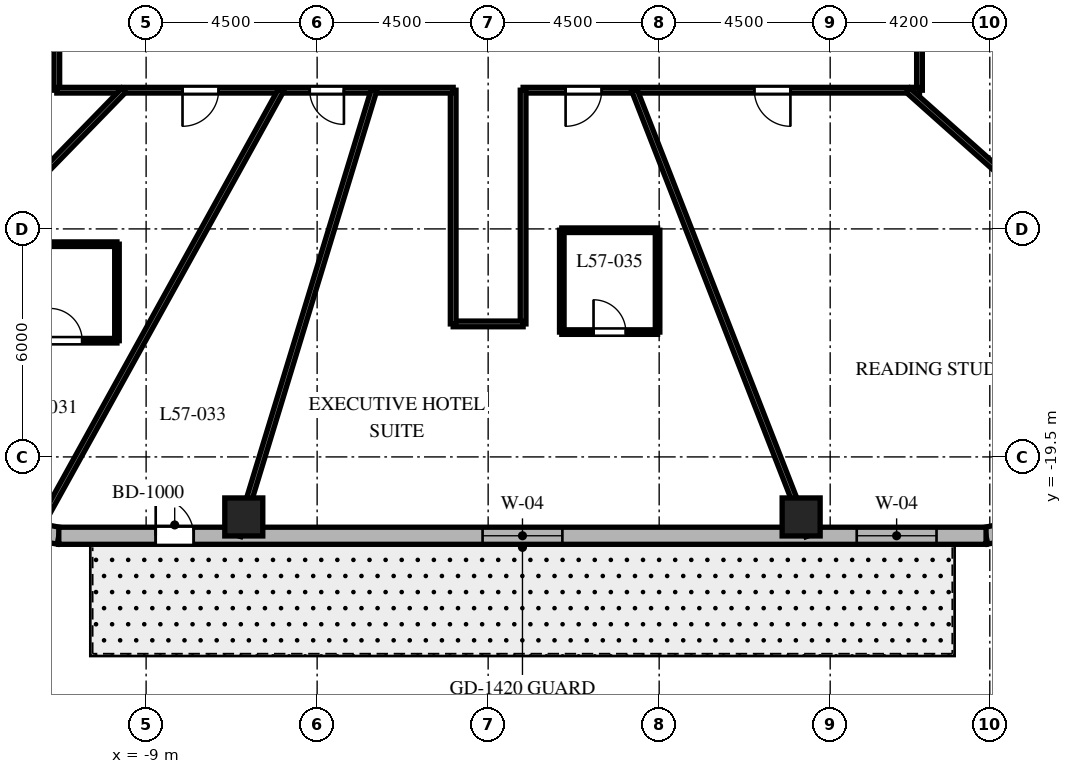
"""IFC4 building model, lengths in metres.
Left out: names, types, materials, properties, quantities, classifications, styles, units other than length and angle.
Written with IfcOpenShell. Run it as: python <this file> out.ifc"""

import sys

from ifc_helpers import new_model, si_unit, direction, frame, frame_2d, origin, origin_2d, place, context, subcontext, project, spatial, rectangle, extrude, element, fill, save


model = new_model("IFC4")
c1 = context("Model", 3, precision=1e-05, world=origin(), true_north=direction((0.0, 1.0)))
c2 = subcontext(c1, "Body", "Model", "MODEL_VIEW")
j1 = project(units=[si_unit("LENGTHUNIT", "METRE"), si_unit("PLANEANGLEUNIT", "RADIAN")], contexts=[c1])
p1 = place(None, origin())
s1 = spatial("IfcSite", under=j1, at=p1, CompositionType="ELEMENT")
p2 = place(p1, origin())
s2 = spatial("IfcBuilding", under=s1, at=p2, CompositionType="ELEMENT")
p3 = place(p2, frame((0.0, 0.0, 229.3)))
s3 = spatial("IfcBuildingStorey", under=s2, at=p3, CompositionType="ELEMENT", Elevation=229.3)
for number, where, z_axis, x_axis in (
    (1, (-6.43, -21.08, 0.0), (0.0, 0.0, 1.0), (1.0, 0.0, 0.0)),
    (2, (8.236, -21.08, 0.0), (0.0, 0.0, 1.0), (1.0, 0.0, 0.0)),
):
    element("IfcColumn", number, at=place(p3, frame(where, z_axis=z_axis, x_axis=x_axis)), inside=s3, PredefinedType="COLUMN", context=c2, shape_type="SweptSolid", body=[
        extrude(rectangle(XDim=1.0, YDim=1.0, at=origin_2d()), origin(), (0.0, 0.0, 1.0), 3.8),
    ])
p4 = place(p3, frame((-12.546, -21.34, 0.0), z_axis=(0.0, 0.0, 1.0), x_axis=(0.982686750835, -0.18527479519, 0.0)))
e3 = element("IfcWall", 3, at=p4, inside=s3, PredefinedType="SOLIDWALL", context=c2, shape_type="SweptSolid", body=[
    extrude(rectangle(XDim=1.27, YDim=0.45, at=frame_2d((0.635, 0.0))), origin(), (0.0, 0.0, 1.0), 3.5),
])
p5 = place(p3, frame((13.102, -21.575, 0.0), z_axis=(0.0, 0.0, 1.0), x_axis=(0.978757421505, 0.205021730188, 0.0)))
e4 = element("IfcWall", 4, at=p5, inside=s3, PredefinedType="SOLIDWALL", context=c2, shape_type="SweptSolid", body=[
    extrude(rectangle(XDim=1.406, YDim=0.45, at=frame_2d((0.703, 0.0))), origin(), (0.0, 0.0, 1.0), 3.5),
])
p6 = place(p3, frame((-11.298, -21.575, 0.0), z_axis=(0.0, 0.0, 1.0), x_axis=(1.0, 0.0, 0.0)))
e5 = element("IfcWall", 5, at=p6, inside=s3, PredefinedType="SOLIDWALL", context=c2, shape_type="SweptSolid", body=[
    extrude(rectangle(XDim=24.399, YDim=0.45, at=frame_2d((12.2, 0.0))), origin(), (0.0, 0.0, 1.0), 3.5),
])
p7 = place(p6, frame((2.55, 0.0, 0.0)))
e6 = element("IfcOpeningElement", 6, at=p7, cuts=e5, PredefinedType="OPENING", context=c2, shape_type="SweptSolid", body=[
    extrude(rectangle(XDim=1.0, YDim=2.15, at=frame_2d((0.5, 1.075))), frame((0.0, 0.235, 0.0), z_axis=(0.0, -1.0, 0.0), x_axis=(1.0, 0.0, 0.0)), (0.0, 0.0, 1.0), 0.47),
])
p8 = place(p6, frame((11.151, 0.0, 0.8)))
e7 = element("IfcOpeningElement", 7, at=p8, cuts=e5, PredefinedType="OPENING", context=c2, shape_type="SweptSolid", body=[
    extrude(rectangle(XDim=2.1, YDim=1.85, at=frame_2d((1.05, 0.925))), frame((0.0, 0.235, 0.0), z_axis=(0.0, -1.0, 0.0), x_axis=(1.0, 0.0, 0.0)), (0.0, 0.0, 1.0), 0.47),
])
p9 = place(p6, frame((20.996, 0.0, 0.8)))
e8 = element("IfcOpeningElement", 8, at=p9, cuts=e5, PredefinedType="OPENING", context=c2, shape_type="SweptSolid", body=[
    extrude(rectangle(XDim=2.1, YDim=1.85, at=frame_2d((1.05, 0.925))), frame((0.0, 0.235, 0.0), z_axis=(0.0, -1.0, 0.0), x_axis=(1.0, 0.0, 0.0)), (0.0, 0.0, 1.0), 0.47),
])
p10 = place(p3, frame((-11.35, -9.85, 0.0), z_axis=(0.0, 0.0, 1.0), x_axis=(0.0, 1.0, 0.0)))
e9 = element("IfcWall", 9, at=p10, inside=s3, PredefinedType="PARTITIONING", context=c2, shape_type="SweptSolid", body=[
    extrude(rectangle(XDim=12.4, YDim=0.15, at=frame_2d((6.2, 0.0))), origin(), (0.0, 0.0, 1.0), 2.99),
])
p11 = place(p10, frame((8.835, 0.0, 0.0)))
e10 = element("IfcOpeningElement", 10, at=p11, cuts=e9, PredefinedType="OPENING", context=c2, shape_type="SweptSolid", body=[
    extrude(rectangle(XDim=0.95, YDim=2.03, at=frame_2d((0.475, 1.015))), frame((0.0, 0.085, 0.0), z_axis=(0.0, -1.0, 0.0), x_axis=(1.0, 0.0, 0.0)), (0.0, 0.0, 1.0), 0.17),
])
p12 = place(p10, frame((4.443, 0.0, 0.0)))
e11 = element("IfcOpeningElement", 11, at=p12, cuts=e9, PredefinedType="OPENING", context=c2, shape_type="SweptSolid", body=[
    extrude(rectangle(XDim=0.95, YDim=2.03, at=frame_2d((0.475, 1.015))), frame((0.0, 0.085, 0.0), z_axis=(0.0, -1.0, 0.0), x_axis=(1.0, 0.0, 0.0)), (0.0, 0.0, 1.0), 0.17),
])
p13 = place(p10, frame((1.242, 0.0, 0.0)))
e12 = element("IfcOpeningElement", 12, at=p13, cuts=e9, PredefinedType="OPENING", context=c2, shape_type="SweptSolid", body=[
    extrude(rectangle(XDim=0.9, YDim=2.03, at=frame_2d((0.45, 1.015))), frame((0.0, 0.085, 0.0), z_axis=(0.0, -1.0, 0.0), x_axis=(1.0, 0.0, 0.0)), (0.0, 0.0, 1.0), 0.17),
])
p14 = place(p3, frame((11.35, -4.4, 0.0), z_axis=(0.0, 0.0, 1.0), x_axis=(0.0, -1.0, 0.0)))
e13 = element("IfcWall", 13, at=p14, inside=s3, PredefinedType="PARTITIONING", context=c2, shape_type="SweptSolid", body=[
    extrude(rectangle(XDim=5.45, YDim=0.15, at=frame_2d((2.725, 0.0))), origin(), (0.0, 0.0, 1.0), 2.99),
])
p15 = place(p14, frame((2.466, 0.0, 0.0)))
e14 = element("IfcOpeningElement", 14, at=p15, cuts=e13, PredefinedType="OPENING", context=c2, shape_type="SweptSolid", body=[
    extrude(rectangle(XDim=0.95, YDim=2.03, at=frame_2d((0.475, 1.015))), frame((0.0, 0.085, 0.0), z_axis=(0.0, -1.0, 0.0), x_axis=(1.0, 0.0, 0.0)), (0.0, 0.0, 1.0), 0.17),
])
p16 = place(p3, frame((11.35, -9.85, 0.0), z_axis=(0.0, 0.0, 1.0), x_axis=(-1.0, 0.0, 0.0)))
e15 = element("IfcWall", 15, at=p16, inside=s3, PredefinedType="PARTITIONING", context=c2, shape_type="SweptSolid", body=[
    extrude(rectangle(XDim=10.43, YDim=0.15, at=frame_2d((5.215, 0.0))), origin(), (0.0, 0.0, 1.0), 2.99),
])
p17 = place(p16, frame((8.362, 0.0, 0.0)))
e16 = element("IfcOpeningElement", 16, at=p17, cuts=e15, PredefinedType="OPENING", context=c2, shape_type="SweptSolid", body=[
    extrude(rectangle(XDim=0.95, YDim=2.03, at=frame_2d((0.475, 1.015))), frame((0.0, 0.085, 0.0), z_axis=(0.0, -1.0, 0.0), x_axis=(1.0, 0.0, 0.0)), (0.0, 0.0, 1.0), 0.17),
])
p18 = place(p16, frame((3.396, 0.0, 0.0)))
e17 = element("IfcOpeningElement", 17, at=p18, cuts=e15, PredefinedType="OPENING", context=c2, shape_type="SweptSolid", body=[
    extrude(rectangle(XDim=0.95, YDim=2.03, at=frame_2d((0.475, 1.015))), frame((0.0, 0.085, 0.0), z_axis=(0.0, -1.0, 0.0), x_axis=(1.0, 0.0, 0.0)), (0.0, 0.0, 1.0), 0.17),
])
p19 = place(p3, frame((0.92, -9.85, 0.0), z_axis=(0.0, 0.0, 1.0), x_axis=(0.0, -1.0, 0.0)))
e18 = element("IfcWall", 18, at=p19, inside=s3, PredefinedType="PARTITIONING", context=c2, shape_type="SweptSolid", body=[
    extrude(rectangle(XDim=6.15, YDim=0.15, at=frame_2d((3.075, 0.0))), origin(), (0.0, 0.0, 1.0), 3.026),
])
p20 = place(p3, frame((0.92, -16.0, 0.0), z_axis=(0.0, 0.0, 1.0), x_axis=(-1.0, 0.0, 0.0)))
e19 = element("IfcWall", 19, at=p20, inside=s3, PredefinedType="PARTITIONING", context=c2, shape_type="SweptSolid", body=[
    extrude(rectangle(XDim=1.84, YDim=0.15, at=frame_2d((0.92, 0.0))), origin(), (0.0, 0.0, 1.0), 3.5),
])
p21 = place(p3, frame((-0.92, -16.0, 0.0), z_axis=(0.0, 0.0, 1.0), x_axis=(0.0, 1.0, 0.0)))
e20 = element("IfcWall", 20, at=p21, inside=s3, PredefinedType="PARTITIONING", context=c2, shape_type="SweptSolid", body=[
    extrude(rectangle(XDim=6.15, YDim=0.15, at=frame_2d((3.075, 0.0))), origin(), (0.0, 0.0, 1.0), 3.026),
])
p22 = place(p3, frame((-0.92, -9.85, 0.0), z_axis=(0.0, 0.0, 1.0), x_axis=(-1.0, 0.0, 0.0)))
e21 = element("IfcWall", 21, at=p22, inside=s3, PredefinedType="PARTITIONING", context=c2, shape_type="SweptSolid", body=[
    extrude(rectangle(XDim=10.43, YDim=0.15, at=frame_2d((5.215, 0.0))), origin(), (0.0, 0.0, 1.0), 2.99),
])
p23 = place(p22, frame((6.172, 0.0, 0.0)))
e22 = element("IfcOpeningElement", 22, at=p23, cuts=e21, PredefinedType="OPENING", context=c2, shape_type="SweptSolid", body=[
    extrude(rectangle(XDim=0.95, YDim=2.03, at=frame_2d((0.475, 1.015))), frame((0.0, 0.085, 0.0), z_axis=(0.0, -1.0, 0.0), x_axis=(1.0, 0.0, 0.0)), (0.0, 0.0, 1.0), 0.17),
])
p24 = place(p22, frame((2.875, 0.0, 0.0)))
e23 = element("IfcOpeningElement", 23, at=p24, cuts=e21, PredefinedType="OPENING", context=c2, shape_type="SweptSolid", body=[
    extrude(rectangle(XDim=0.9, YDim=2.03, at=frame_2d((0.45, 1.015))), frame((0.0, 0.085, 0.0), z_axis=(0.0, -1.0, 0.0), x_axis=(1.0, 0.0, 0.0)), (0.0, 0.0, 1.0), 0.17),
])
p25 = place(p3, frame((-11.35, -6.705, 0.0), z_axis=(0.0, 0.0, 1.0), x_axis=(-0.86097625004, -0.508645158108, 0.0)))
e24 = element("IfcWall", 24, at=p25, inside=s3, PredefinedType="PARTITIONING", context=c2, shape_type="SweptSolid", body=[
    extrude(rectangle(XDim=8.406, YDim=0.15, at=frame_2d((4.203, 0.0))), origin(), (0.0, 0.0, 1.0), 2.74),
])
p26 = place(p3, frame((-9.588, -9.85, 0.0), z_axis=(0.0, 0.0, 1.0), x_axis=(-0.697519469595, -0.716565830567, 0.0)))
e25 = element("IfcWall", 25, at=p26, inside=s3, PredefinedType="PARTITIONING", context=c2, shape_type="SweptSolid", body=[
    extrude(rectangle(XDim=9.126, YDim=0.15, at=frame_2d((4.563, 0.0))), origin(), (0.0, 0.0, 1.0), 2.74),
])
p27 = place(p3, frame((-5.451, -9.85, 0.0), z_axis=(0.0, 0.0, 1.0), x_axis=(-0.484188830955, -0.87496352837, 0.0)))
e26 = element("IfcWall", 26, at=p27, inside=s3, PredefinedType="PARTITIONING", context=c2, shape_type="SweptSolid", body=[
    extrude(rectangle(XDim=13.107, YDim=0.15, at=frame_2d((6.553, 0.0))), origin(), (0.0, 0.0, 1.0), 2.74),
])
p28 = place(p3, frame((-3.004, -9.85, 0.0), z_axis=(0.0, 0.0, 1.0), x_axis=(-0.291775760688, -0.956486751333, 0.0)))
e27 = element("IfcWall", 27, at=p28, inside=s3, PredefinedType="PARTITIONING", context=c2, shape_type="SweptSolid", body=[
    extrude(rectangle(XDim=12.258, YDim=0.15, at=frame_2d((6.129, 0.0))), origin(), (0.0, 0.0, 1.0), 2.74),
])
p29 = place(p3, frame((3.848, -9.85, 0.0), z_axis=(0.0, 0.0, 1.0), x_axis=(0.363921778212, -0.931429513889, 0.0)))
e28 = element("IfcWall", 28, at=p29, inside=s3, PredefinedType="PARTITIONING", context=c2, shape_type="SweptSolid", body=[
    extrude(rectangle(XDim=12.588, YDim=0.15, at=frame_2d((6.294, 0.0))), origin(), (0.0, 0.0, 1.0), 2.74),
])
p30 = place(p3, frame((11.048, -9.85, 0.0), z_axis=(0.0, 0.0, 1.0), x_axis=(0.746444434655, -0.665447748492, 0.0)))
e29 = element("IfcWall", 29, at=p30, inside=s3, PredefinedType="PARTITIONING", context=c2, shape_type="SweptSolid", body=[
    extrude(rectangle(XDim=8.732, YDim=0.15, at=frame_2d((4.366, 0.0))), origin(), (0.0, 0.0, 1.0), 2.74),
])
p31 = place(p3, frame((11.35, -5.072, 0.0), z_axis=(0.0, 0.0, 1.0), x_axis=(0.912980177983, -0.408003914944, 0.0)))
e30 = element("IfcWall", 30, at=p31, inside=s3, PredefinedType="PARTITIONING", context=c2, shape_type="SweptSolid", body=[
    extrude(rectangle(XDim=9.358, YDim=0.15, at=frame_2d((4.679, 0.0))), origin(), (0.0, 0.0, 1.0), 2.74),
])
p32 = place(p3, frame((-12.447, -16.442, 0.0), z_axis=(0.0, 0.0, 1.0), x_axis=(1.0, 0.0, 0.0)))
e31 = element("IfcWall", 31, at=p32, inside=s3, PredefinedType="PARTITIONING", context=c2, shape_type="SweptSolid", body=[
    extrude(rectangle(XDim=2.68, YDim=0.12, at=frame_2d((1.34, 0.0))), origin(), (0.0, 0.0, 1.0), 3.5),
])
p33 = place(p32, frame((0.915, 0.0, 0.0)))
e32 = element("IfcOpeningElement", 32, at=p33, cuts=e31, PredefinedType="OPENING", context=c2, shape_type="SweptSolid", body=[
    extrude(rectangle(XDim=0.85, YDim=2.03, at=frame_2d((0.425, 1.015))), frame((0.0, 0.07, 0.0), z_axis=(0.0, -1.0, 0.0), x_axis=(1.0, 0.0, 0.0)), (0.0, 0.0, 1.0), 0.14),
])
p34 = place(p3, frame((-9.767, -16.442, 0.0), z_axis=(0.0, 0.0, 1.0), x_axis=(0.0, 1.0, 0.0)))
e33 = element("IfcWall", 33, at=p34, inside=s3, PredefinedType="PARTITIONING", context=c2, shape_type="SweptSolid", body=[
    extrude(rectangle(XDim=2.54, YDim=0.12, at=frame_2d((1.27, 0.0))), origin(), (0.0, 0.0, 1.0), 3.072),
])
p35 = place(p3, frame((-9.767, -13.902, 0.0), z_axis=(0.0, 0.0, 1.0), x_axis=(-1.0, 0.0, 0.0)))
e34 = element("IfcWall", 34, at=p35, inside=s3, PredefinedType="PARTITIONING", context=c2, shape_type="SweptSolid", body=[
    extrude(rectangle(XDim=2.68, YDim=0.12, at=frame_2d((1.34, 0.0))), origin(), (0.0, 0.0, 1.0), 3.072),
])
p36 = place(p3, frame((1.938, -16.215, 0.0), z_axis=(0.0, 0.0, 1.0), x_axis=(1.0, 0.0, 0.0)))
e35 = element("IfcWall", 35, at=p36, inside=s3, PredefinedType="PARTITIONING", context=c2, shape_type="SweptSolid", body=[
    extrude(rectangle(XDim=2.52, YDim=0.12, at=frame_2d((1.26, 0.0))), origin(), (0.0, 0.0, 1.0), 3.5),
])
p37 = place(p36, frame((0.835, 0.0, 0.0)))
e36 = element("IfcOpeningElement", 36, at=p37, cuts=e35, PredefinedType="OPENING", context=c2, shape_type="SweptSolid", body=[
    extrude(rectangle(XDim=0.85, YDim=2.03, at=frame_2d((0.425, 1.015))), frame((0.0, 0.07, 0.0), z_axis=(0.0, -1.0, 0.0), x_axis=(1.0, 0.0, 0.0)), (0.0, 0.0, 1.0), 0.14),
])
p38 = place(p3, frame((4.458, -16.215, 0.0), z_axis=(0.0, 0.0, 1.0), x_axis=(0.0, 1.0, 0.0)))
e37 = element("IfcWall", 37, at=p38, inside=s3, PredefinedType="PARTITIONING", context=c2, shape_type="SweptSolid", body=[
    extrude(rectangle(XDim=2.68, YDim=0.12, at=frame_2d((1.34, 0.0))), origin(), (0.0, 0.0, 1.0), 3.026),
])
p39 = place(p3, frame((4.458, -13.535, 0.0), z_axis=(0.0, 0.0, 1.0), x_axis=(-1.0, 0.0, 0.0)))
e38 = element("IfcWall", 38, at=p39, inside=s3, PredefinedType="PARTITIONING", context=c2, shape_type="SweptSolid", body=[
    extrude(rectangle(XDim=2.52, YDim=0.12, at=frame_2d((1.26, 0.0))), origin(), (0.0, 0.0, 1.0), 3.026),
])
p40 = place(p3, frame((1.938, -13.535, 0.0), z_axis=(0.0, 0.0, 1.0), x_axis=(0.0, -1.0, 0.0)))
e39 = element("IfcWall", 39, at=p40, inside=s3, PredefinedType="PARTITIONING", context=c2, shape_type="SweptSolid", body=[
    extrude(rectangle(XDim=2.68, YDim=0.12, at=frame_2d((1.34, 0.0))), origin(), (0.0, 0.0, 1.0), 3.026),
])
p41 = place(p7, origin())
e40 = element("IfcDoor", 40, at=p41, inside=s3, OperationType="SINGLE_SWING_LEFT", PredefinedType="DOOR", context=c2, shape_type="SweptSolid", body=[
    extrude(rectangle(XDim=1.0, YDim=2.15, at=frame_2d((0.5, 1.075))), frame((0.0, 0.025, 0.0), z_axis=(0.0, -1.0, 0.0), x_axis=(1.0, 0.0, 0.0)), (0.0, 0.0, 1.0), 0.05),
])
fill(e6, e40)
p42 = place(p8, origin())
e41 = element("IfcWindow", 41, at=p42, inside=s3, PartitioningType="SINGLE_PANEL", PredefinedType="WINDOW", context=c2, shape_type="SweptSolid", body=[
    extrude(rectangle(XDim=2.1, YDim=1.85, at=frame_2d((1.05, 0.925))), frame((0.0, 0.03, 0.0), z_axis=(0.0, -1.0, 0.0), x_axis=(1.0, 0.0, 0.0)), (0.0, 0.0, 1.0), 0.06),
])
fill(e7, e41)
p43 = place(p9, origin())
e42 = element("IfcWindow", 42, at=p43, inside=s3, PartitioningType="SINGLE_PANEL", PredefinedType="WINDOW", context=c2, shape_type="SweptSolid", body=[
    extrude(rectangle(XDim=2.1, YDim=1.85, at=frame_2d((1.05, 0.925))), frame((0.0, 0.03, 0.0), z_axis=(0.0, -1.0, 0.0), x_axis=(1.0, 0.0, 0.0)), (0.0, 0.0, 1.0), 0.06),
])
fill(e8, e42)
p44 = place(p23, origin())
e43 = element("IfcDoor", 43, at=p44, inside=s3, OperationType="SINGLE_SWING_RIGHT", PredefinedType="DOOR", context=c2, shape_type="SweptSolid", body=[
    extrude(rectangle(XDim=0.95, YDim=2.03, at=frame_2d((0.475, 1.015))), frame((0.0, 0.025, 0.0), z_axis=(0.0, -1.0, 0.0), x_axis=(1.0, 0.0, 0.0)), (0.0, 0.0, 1.0), 0.05),
])
fill(e22, e43)
p45 = place(p33, origin())
e44 = element("IfcDoor", 44, at=p45, inside=s3, OperationType="SINGLE_SWING_LEFT", PredefinedType="DOOR", context=c2, shape_type="SweptSolid", body=[
    extrude(rectangle(XDim=0.85, YDim=2.03, at=frame_2d((0.425, 1.015))), frame((0.0, 0.025, 0.0), z_axis=(0.0, -1.0, 0.0), x_axis=(1.0, 0.0, 0.0)), (0.0, 0.0, 1.0), 0.05),
])
fill(e32, e44)
p46 = place(p24, origin())
e45 = element("IfcDoor", 45, at=p46, inside=s3, OperationType="SINGLE_SWING_LEFT", PredefinedType="DOOR", context=c2, shape_type="SweptSolid", body=[
    extrude(rectangle(XDim=0.9, YDim=2.03, at=frame_2d((0.45, 1.015))), frame((0.0, 0.025, 0.0), z_axis=(0.0, -1.0, 0.0), x_axis=(1.0, 0.0, 0.0)), (0.0, 0.0, 1.0), 0.05),
])
fill(e23, e45)
p47 = place(p17, origin())
e46 = element("IfcDoor", 46, at=p47, inside=s3, OperationType="SINGLE_SWING_RIGHT", PredefinedType="DOOR", context=c2, shape_type="SweptSolid", body=[
    extrude(rectangle(XDim=0.95, YDim=2.03, at=frame_2d((0.475, 1.015))), frame((0.0, 0.025, 0.0), z_axis=(0.0, -1.0, 0.0), x_axis=(1.0, 0.0, 0.0)), (0.0, 0.0, 1.0), 0.05),
])
fill(e16, e46)
p48 = place(p37, origin())
e47 = element("IfcDoor", 47, at=p48, inside=s3, OperationType="SINGLE_SWING_LEFT", PredefinedType="DOOR", context=c2, shape_type="SweptSolid", body=[
    extrude(rectangle(XDim=0.85, YDim=2.03, at=frame_2d((0.425, 1.015))), frame((0.0, 0.025, 0.0), z_axis=(0.0, -1.0, 0.0), x_axis=(1.0, 0.0, 0.0)), (0.0, 0.0, 1.0), 0.05),
])
fill(e36, e47)
p49 = place(p18, origin())
e48 = element("IfcDoor", 48, at=p49, inside=s3, OperationType="SINGLE_SWING_LEFT", PredefinedType="DOOR", context=c2, shape_type="SweptSolid", body=[
    extrude(rectangle(XDim=0.95, YDim=2.03, at=frame_2d((0.475, 1.015))), frame((0.0, 0.025, 0.0), z_axis=(0.0, -1.0, 0.0), x_axis=(1.0, 0.0, 0.0)), (0.0, 0.0, 1.0), 0.05),
])
fill(e17, e48)
save(model, sys.argv[1])
